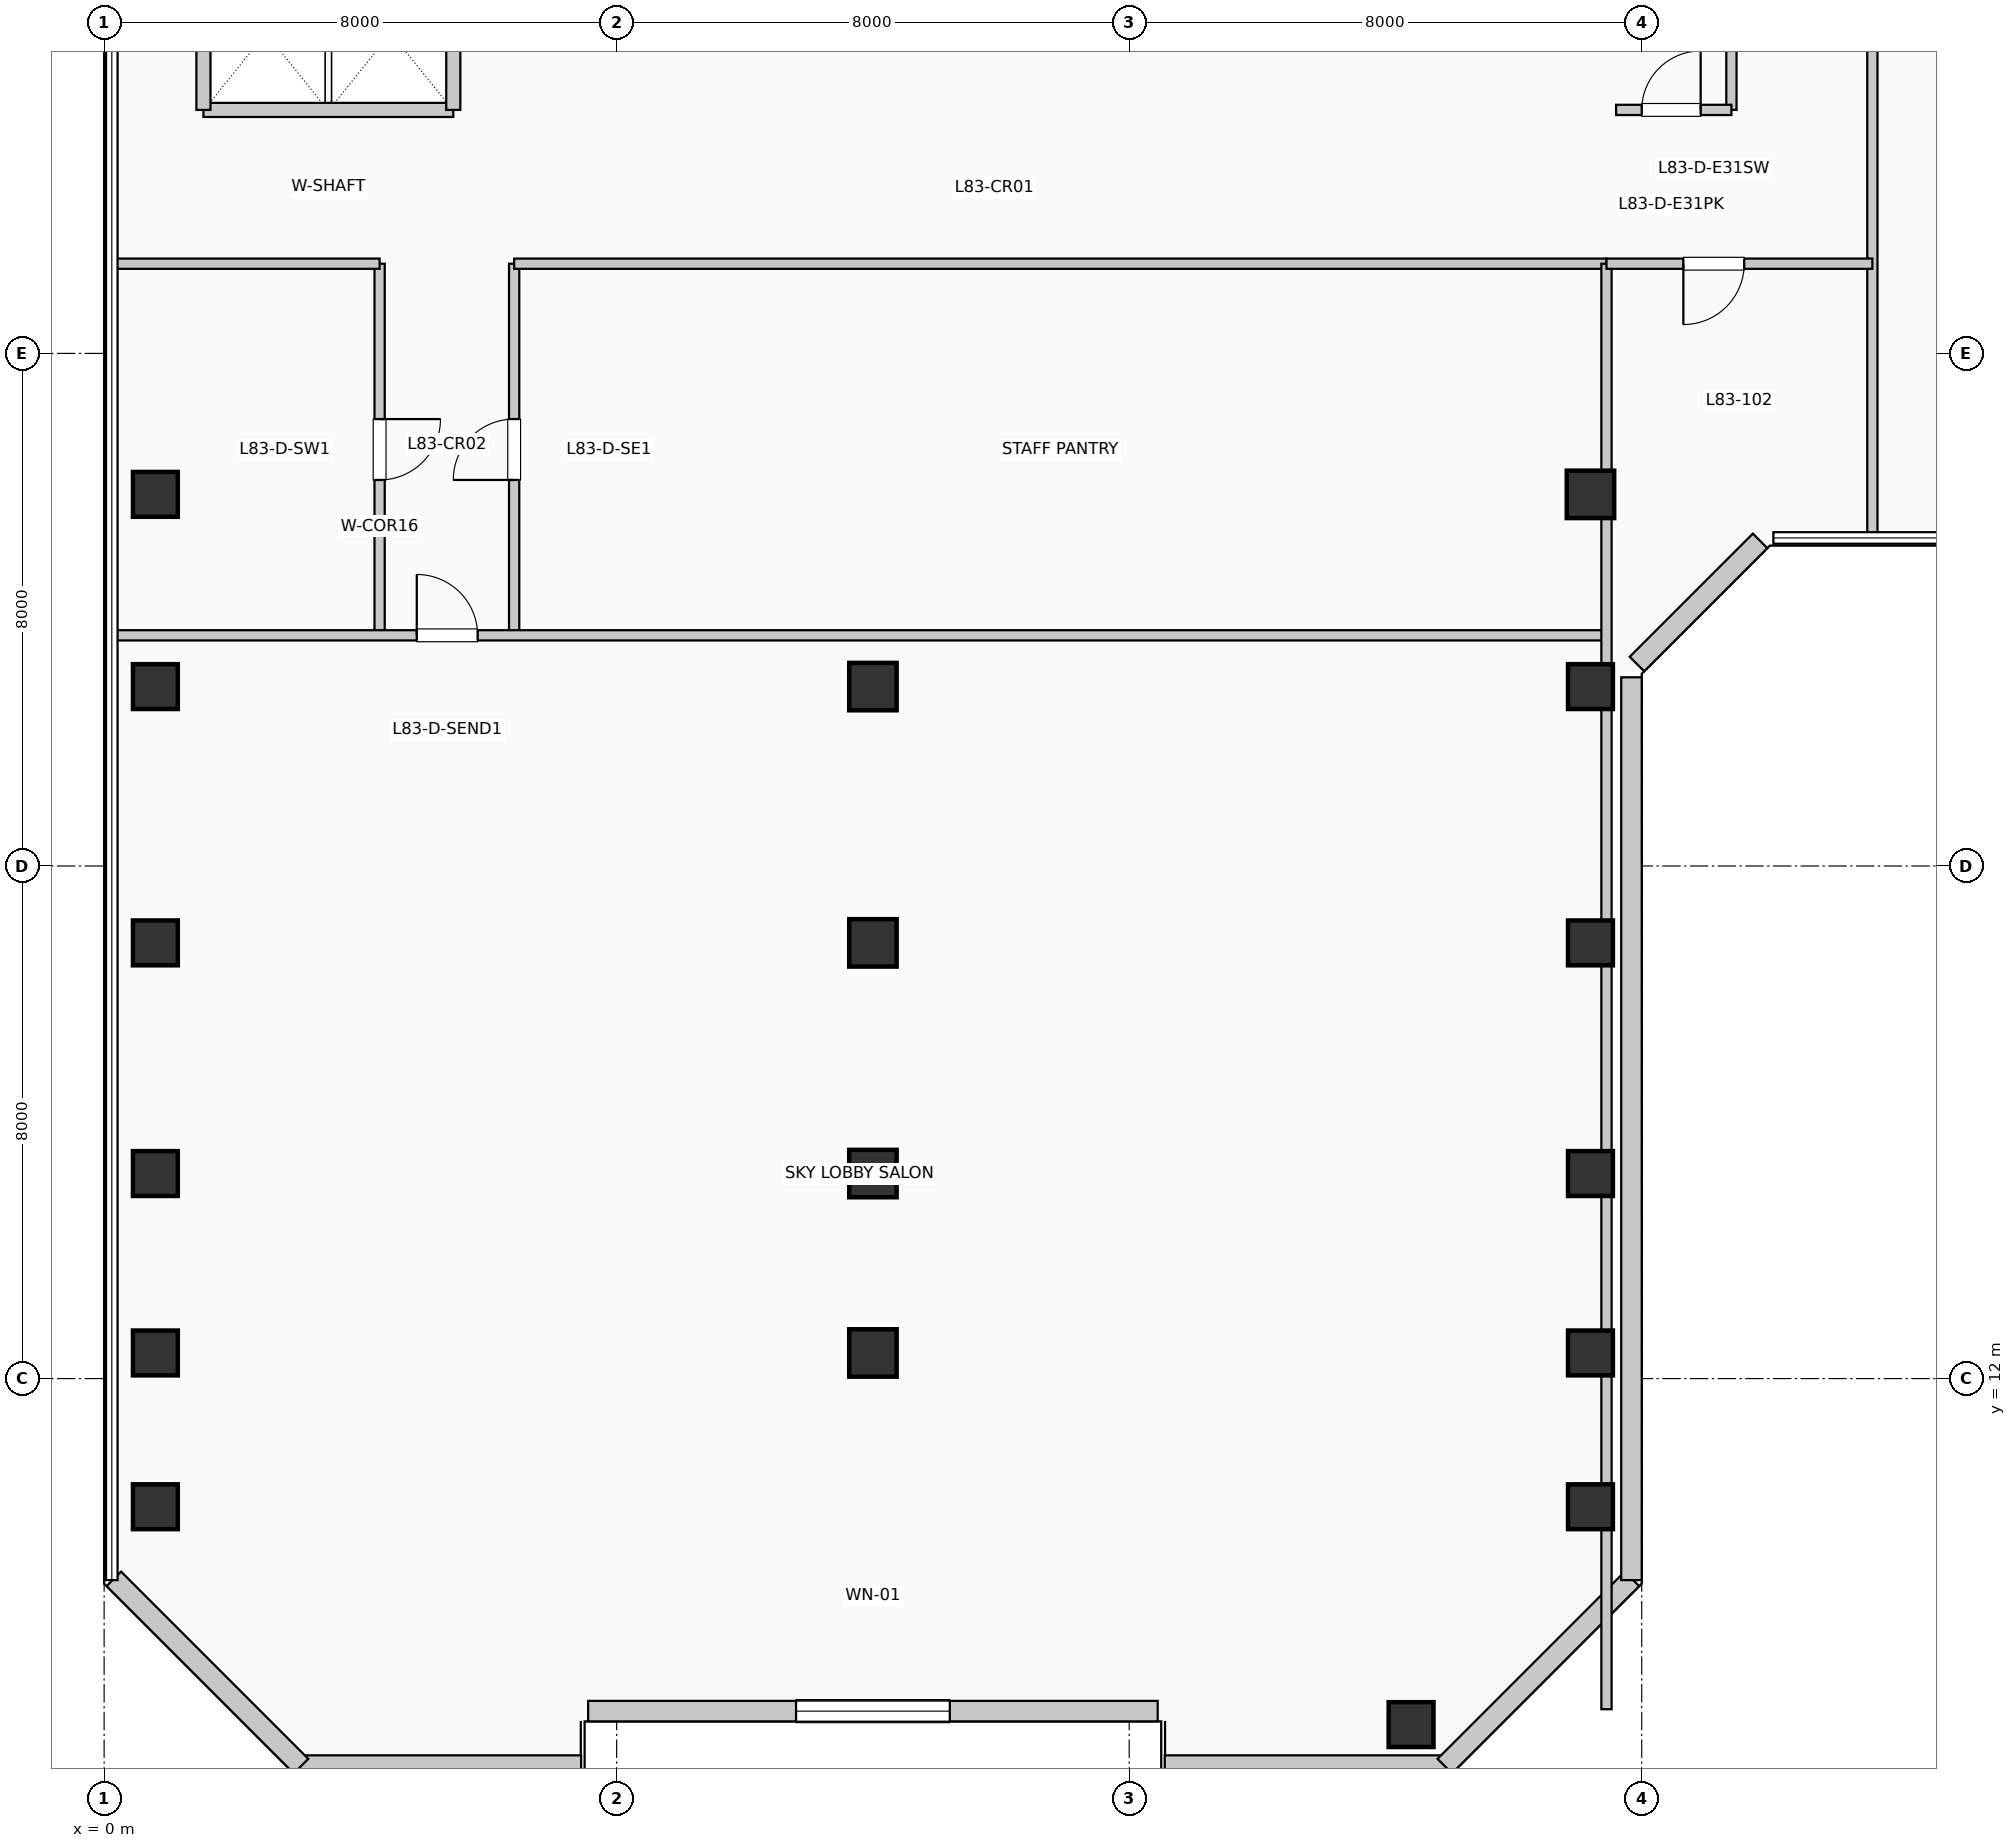
"""IFC4 building model, lengths in metres.
Left out: names, types, materials, properties, quantities, classifications, styles, units other than length and angle.
Written with IfcOpenShell. Run it as: python <this file> out.ifc"""

import sys

from ifc_helpers import new_model, si_unit, direction, frame, frame_2d, origin, origin_2d, place, context, subcontext, project, spatial, rectangle, extrude, element, fill, save


model = new_model("IFC4")
c1 = context("Model", 3, precision=1e-05, world=origin(), true_north=direction((0.0, 1.0)))
c2 = subcontext(c1, "Body", "Model", "MODEL_VIEW")
j1 = project(units=[si_unit("LENGTHUNIT", "METRE"), si_unit("PLANEANGLEUNIT", "RADIAN")], contexts=[c1])
p1 = place(None, origin())
s1 = spatial("IfcSite", under=j1, at=p1, CompositionType="ELEMENT")
p2 = place(p1, origin())
s2 = spatial("IfcBuilding", under=s1, at=p2, CompositionType="ELEMENT")
p3 = place(p2, frame((0.0, 0.0, 339.57)))
s3 = spatial("IfcBuildingStorey", under=s2, at=p3, CompositionType="ELEMENT", Elevation=339.57)
for number, where, z_axis, x_axis in (
    (1, (0.8, 10.0, 0.0), (0.0, 0.0, 1.0), (1.0, 0.0, 0.0)),
    (2, (0.8, 12.4, 0.0), (0.0, 0.0, 1.0), (1.0, 0.0, 0.0)),
    (3, (0.8, 15.2, 0.0), (0.0, 0.0, 1.0), (1.0, 0.0, 0.0)),
    (4, (0.8, 18.8, 0.0), (0.0, 0.0, 1.0), (1.0, 0.0, 0.0)),
    (5, (0.8, 22.8, 0.0), (0.0, 0.0, 1.0), (1.0, 0.0, 0.0)),
    (6, (0.8, 25.8, 0.0), (0.0, 0.0, 1.0), (1.0, 0.0, 0.0)),
):
    element("IfcColumn", number, at=place(p3, frame(where, z_axis=z_axis, x_axis=x_axis)), inside=s3, PredefinedType="COLUMN", context=c2, shape_type="SweptSolid", body=[
        extrude(rectangle(XDim=0.7, YDim=0.7, at=origin_2d()), origin(), (0.0, 0.0, 1.0), 3.96),
    ])
for number, where, z_axis, x_axis in (
    (7, (12.0, 12.4, 0.0), (0.0, 0.0, 1.0), (1.0, 0.0, 0.0)),
    (8, (12.0, 15.2, 0.0), (0.0, 0.0, 1.0), (1.0, 0.0, 0.0)),
    (9, (12.0, 18.8, 0.0), (0.0, 0.0, 1.0), (1.0, 0.0, 0.0)),
    (10, (12.0, 22.8, 0.0), (0.0, 0.0, 1.0), (1.0, 0.0, 0.0)),
):
    element("IfcColumn", number, at=place(p3, frame(where, z_axis=z_axis, x_axis=x_axis)), inside=s3, PredefinedType="COLUMN", context=c2, shape_type="SweptSolid", body=[
        extrude(rectangle(XDim=0.74, YDim=0.74, at=origin_2d()), origin(), (0.0, 0.0, 1.0), 3.96),
    ])
for number, where, z_axis, x_axis in (
    (11, (20.4, 6.6, 0.0), (0.0, 0.0, 1.0), (1.0, 0.0, 0.0)),
    (12, (23.2, 10.0, 0.0), (0.0, 0.0, 1.0), (1.0, 0.0, 0.0)),
    (13, (23.2, 12.4, 0.0), (0.0, 0.0, 1.0), (1.0, 0.0, 0.0)),
    (14, (23.2, 15.2, 0.0), (0.0, 0.0, 1.0), (1.0, 0.0, 0.0)),
    (15, (23.2, 18.8, 0.0), (0.0, 0.0, 1.0), (1.0, 0.0, 0.0)),
    (16, (23.2, 22.8, 0.0), (0.0, 0.0, 1.0), (1.0, 0.0, 0.0)),
):
    element("IfcColumn", number, at=place(p3, frame(where, z_axis=z_axis, x_axis=x_axis)), inside=s3, PredefinedType="COLUMN", context=c2, shape_type="SweptSolid", body=[
        extrude(rectangle(XDim=0.7, YDim=0.7, at=origin_2d()), origin(), (0.0, 0.0, 1.0), 3.96),
    ])
p4 = place(p3, frame((23.2, 25.8, 0.0), z_axis=(0.0, 0.0, 1.0), x_axis=(1.0, 0.0, 0.0)))
e17 = element("IfcColumn", 17, at=p4, inside=s3, PredefinedType="COLUMN", context=c2, shape_type="SweptSolid", body=[
    extrude(rectangle(XDim=0.74, YDim=0.74, at=origin_2d()), origin(), (0.0, 0.0, 1.0), 3.96),
])
p5 = place(p3, frame((3.055, 5.96, 0.0), z_axis=(0.0, 0.0, 1.0), x_axis=(1.0, 0.0, 0.0)))
e18 = element("IfcWall", 18, at=p5, inside=s3, PredefinedType="SOLIDWALL", context=c2, shape_type="SweptSolid", body=[
    extrude(rectangle(XDim=4.39, YDim=0.32, at=frame_2d((2.195, 0.0))), origin(), (0.0, 0.0, 1.0), 3.74),
])
p6 = place(p3, frame((7.555, 6.81, 0.0), z_axis=(0.0, 0.0, 1.0), x_axis=(1.0, 0.0, 0.0)))
e19 = element("IfcWall", 19, at=p6, inside=s3, PredefinedType="SOLIDWALL", context=c2, shape_type="SweptSolid", body=[
    extrude(rectangle(XDim=8.89, YDim=0.32, at=frame_2d((4.445, 0.0))), origin(), (0.0, 0.0, 1.0), 3.74),
])
p7 = place(p6, frame((3.245, 0.0, 0.85)))
e20 = element("IfcOpeningElement", 20, at=p7, cuts=e19, PredefinedType="OPENING", context=c2, shape_type="SweptSolid", body=[
    extrude(rectangle(XDim=2.4, YDim=2.05, at=frame_2d((1.2, 1.025))), frame((0.0, 0.17, 0.0), z_axis=(0.0, -1.0, 0.0), x_axis=(1.0, 0.0, 0.0)), (0.0, 0.0, 1.0), 0.34),
])
p8 = place(p3, frame((16.555, 5.96, 0.0), z_axis=(0.0, 0.0, 1.0), x_axis=(1.0, 0.0, 0.0)))
e21 = element("IfcWall", 21, at=p8, inside=s3, PredefinedType="SOLIDWALL", context=c2, shape_type="SweptSolid", body=[
    extrude(rectangle(XDim=4.39, YDim=0.32, at=frame_2d((2.195, 0.0))), origin(), (0.0, 0.0, 1.0), 3.74),
])
p9 = place(p3, frame((20.926, 5.952, 0.0), z_axis=(0.0, 0.0, 1.0), x_axis=(0.707077242712, 0.707136318428, 0.0)))
e22 = element("IfcWall", 22, at=p9, inside=s3, PredefinedType="SOLIDWALL", context=c2, shape_type="SweptSolid", body=[
    extrude(rectangle(XDim=4.133, YDim=0.32, at=frame_2d((2.066, 0.0))), origin(), (0.0, 0.0, 1.0), 3.74),
])
p10 = place(p3, frame((23.84, 8.855, 0.0), z_axis=(0.0, 0.0, 1.0), x_axis=(0.0, 1.0, 0.0)))
e23 = element("IfcWall", 23, at=p10, inside=s3, PredefinedType="SOLIDWALL", context=c2, shape_type="SweptSolid", body=[
    extrude(rectangle(XDim=14.09, YDim=0.32, at=frame_2d((7.045, 0.0))), origin(), (0.0, 0.0, 1.0), 3.74),
])
p11 = place(p3, frame((23.926, 23.152, 0.0), z_axis=(0.0, 0.0, 1.0), x_axis=(0.707106781187, 0.707106781187, 0.0)))
e24 = element("IfcWall", 24, at=p11, inside=s3, PredefinedType="SOLIDWALL", context=c2, shape_type="SweptSolid", body=[
    extrude(rectangle(XDim=2.718, YDim=0.32, at=frame_2d((1.359, 0.0))), origin(), (0.0, 0.0, 1.0), 3.74),
])
p12 = place(p3, frame((0.152, 8.874, 0.0), z_axis=(0.0, 0.0, 1.0), x_axis=(0.707077242712, -0.707136318428, 0.0)))
e25 = element("IfcWall", 25, at=p12, inside=s3, PredefinedType="SOLIDWALL", context=c2, shape_type="SweptSolid", body=[
    extrude(rectangle(XDim=4.133, YDim=0.32, at=frame_2d((2.066, 0.0))), origin(), (0.0, 0.0, 1.0), 3.74),
])
p13 = place(p3, frame((1.55, 31.8, 0.0), z_axis=(0.0, 0.0, 1.0), x_axis=(1.0, 0.0, 0.0)))
e26 = element("IfcWall", 26, at=p13, inside=s3, PredefinedType="PARTITIONING", context=c2, shape_type="SweptSolid", body=[
    extrude(rectangle(XDim=3.9, YDim=0.22, at=frame_2d((1.95, 0.0))), origin(), (0.0, 0.0, 1.0), 3.74),
])
for number, where, z_axis, x_axis in (
    (27, (1.55, 31.8, 0.0), (0.0, 0.0, 1.0), (0.0, 1.0, 0.0)),
    (28, (5.45, 31.8, 0.0), (0.0, 0.0, 1.0), (0.0, 1.0, 0.0)),
):
    element("IfcWall", number, at=place(p3, frame(where, z_axis=z_axis, x_axis=x_axis)), inside=s3, PredefinedType="PARTITIONING", context=c2, shape_type="SweptSolid", body=[
        extrude(rectangle(XDim=2.38, YDim=0.22, at=frame_2d((1.19, 0.0))), origin(), (0.0, 0.0, 1.0), 3.74),
    ])
p14 = place(p3, frame((4.3, 23.6, 0.0), z_axis=(0.0, 0.0, 1.0), x_axis=(0.0, 1.0, 0.0)))
e29 = element("IfcWall", 29, at=p14, inside=s3, PredefinedType="PARTITIONING", context=c2, shape_type="SweptSolid", body=[
    extrude(rectangle(XDim=5.8, YDim=0.16, at=frame_2d((2.9, 0.0))), origin(), (0.0, 0.0, 1.0), 3.74),
])
p15 = place(p14, frame((3.375, 0.0, 0.0), z_axis=(0.0, 0.0, 1.0), x_axis=(-1.0, 0.0, 0.0)))
e30 = element("IfcOpeningElement", 30, at=p15, cuts=e29, PredefinedType="OPENING", context=c2, shape_type="SweptSolid", body=[
    extrude(rectangle(XDim=0.95, YDim=2.15, at=frame_2d((0.475, 1.075))), frame((0.0, 0.09, 0.0), z_axis=(0.0, -1.0, 0.0), x_axis=(1.0, 0.0, 0.0)), (0.0, 0.0, 1.0), 0.18),
])
p16 = place(p3, frame((6.4, 23.6, 0.0), z_axis=(0.0, 0.0, 1.0), x_axis=(0.0, 1.0, 0.0)))
e31 = element("IfcWall", 31, at=p16, inside=s3, PredefinedType="PARTITIONING", context=c2, shape_type="SweptSolid", body=[
    extrude(rectangle(XDim=5.8, YDim=0.16, at=frame_2d((2.9, 0.0))), origin(), (0.0, 0.0, 1.0), 3.74),
])
p17 = place(p16, frame((2.425, 0.0, 0.0)))
e32 = element("IfcOpeningElement", 32, at=p17, cuts=e31, PredefinedType="OPENING", context=c2, shape_type="SweptSolid", body=[
    extrude(rectangle(XDim=0.95, YDim=2.15, at=frame_2d((0.475, 1.075))), frame((0.0, 0.09, 0.0), z_axis=(0.0, -1.0, 0.0), x_axis=(1.0, 0.0, 0.0)), (0.0, 0.0, 1.0), 0.18),
])
p18 = place(p3, frame((0.19, 23.6, 0.0), z_axis=(0.0, 0.0, 1.0), x_axis=(1.0, 0.0, 0.0)))
e33 = element("IfcWall", 33, at=p18, inside=s3, PredefinedType="PARTITIONING", context=c2, shape_type="SweptSolid", body=[
    extrude(rectangle(XDim=23.26, YDim=0.16, at=frame_2d((11.63, 0.0))), origin(), (0.0, 0.0, 1.0), 3.74),
])
p19 = place(p18, frame((4.69, 0.0, 0.0)))
e34 = element("IfcOpeningElement", 34, at=p19, cuts=e33, PredefinedType="OPENING", context=c2, shape_type="SweptSolid", body=[
    extrude(rectangle(XDim=0.95, YDim=2.15, at=frame_2d((0.475, 1.075))), frame((0.0, 0.09, 0.0), z_axis=(0.0, -1.0, 0.0), x_axis=(1.0, 0.0, 0.0)), (0.0, 0.0, 1.0), 0.18),
])
p20 = place(p3, frame((0.19, 29.4, 0.0), z_axis=(0.0, 0.0, 1.0), x_axis=(1.0, 0.0, 0.0)))
e35 = element("IfcWall", 35, at=p20, inside=s3, PredefinedType="PARTITIONING", context=c2, shape_type="SweptSolid", body=[
    extrude(rectangle(XDim=4.11, YDim=0.16, at=frame_2d((2.055, 0.0))), origin(), (0.0, 0.0, 1.0), 3.425),
])
p21 = place(p3, frame((6.4, 29.4, 0.0), z_axis=(0.0, 0.0, 1.0), x_axis=(1.0, 0.0, 0.0)))
e36 = element("IfcWall", 36, at=p21, inside=s3, PredefinedType="PARTITIONING", context=c2, shape_type="SweptSolid", body=[
    extrude(rectangle(XDim=17.05, YDim=0.16, at=frame_2d((8.525, 0.0))), origin(), (0.0, 0.0, 1.0), 3.425),
])
p22 = place(p3, frame((23.45, 6.84, 0.0), z_axis=(0.0, 0.0, 1.0), x_axis=(0.0, 1.0, 0.0)))
e37 = element("IfcWall", 37, at=p22, inside=s3, PredefinedType="PARTITIONING", context=c2, shape_type="SweptSolid", body=[
    extrude(rectangle(XDim=22.56, YDim=0.16, at=frame_2d((11.28, 0.0))), origin(), (0.0, 0.0, 1.0), 3.175),
])
p23 = place(p3, frame((25.4, 31.8, 0.0), z_axis=(0.0, 0.0, 1.0), x_axis=(0.0, 1.0, 0.0)))
e38 = element("IfcWall", 38, at=p23, inside=s3, PredefinedType="PARTITIONING", context=c2, shape_type="SweptSolid", body=[
    extrude(rectangle(XDim=14.01, YDim=0.16, at=frame_2d((7.005, 0.0))), origin(), (0.0, 0.0, 1.0), 3.74),
])
p24 = place(p3, frame((27.6, 25.19, 0.0), z_axis=(0.0, 0.0, 1.0), x_axis=(0.0, 1.0, 0.0)))
e39 = element("IfcWall", 39, at=p24, inside=s3, PredefinedType="PARTITIONING", context=c2, shape_type="SweptSolid", body=[
    extrude(rectangle(XDim=15.21, YDim=0.16, at=frame_2d((7.605, 0.0))), origin(), (0.0, 0.0, 1.0), 3.74),
])
p25 = place(p3, frame((23.45, 29.4, 0.0), z_axis=(0.0, 0.0, 1.0), x_axis=(1.0, 0.0, 0.0)))
e40 = element("IfcWall", 40, at=p25, inside=s3, PredefinedType="PARTITIONING", context=c2, shape_type="SweptSolid", body=[
    extrude(rectangle(XDim=4.15, YDim=0.16, at=frame_2d((2.075, 0.0))), origin(), (0.0, 0.0, 1.0), 3.425),
])
p26 = place(p25, frame((2.15, 0.0, 0.0), z_axis=(0.0, 0.0, 1.0), x_axis=(-1.0, 0.0, 0.0)))
e41 = element("IfcOpeningElement", 41, at=p26, cuts=e40, PredefinedType="OPENING", context=c2, shape_type="SweptSolid", body=[
    extrude(rectangle(XDim=0.95, YDim=2.15, at=frame_2d((0.475, 1.075))), frame((0.0, 0.09, 0.0), z_axis=(0.0, -1.0, 0.0), x_axis=(1.0, 0.0, 0.0)), (0.0, 0.0, 1.0), 0.18),
])
p27 = place(p3, frame((23.6, 31.8, 0.0), z_axis=(0.0, 0.0, 1.0), x_axis=(1.0, 0.0, 0.0)))
e42 = element("IfcWall", 42, at=p27, inside=s3, PredefinedType="PARTITIONING", context=c2, shape_type="SweptSolid", body=[
    extrude(rectangle(XDim=1.8, YDim=0.16, at=frame_2d((0.9, 0.0))), origin(), (0.0, 0.0, 1.0), 3.74),
])
p28 = place(p27, frame((0.4, 0.0, 0.0)))
e43 = element("IfcOpeningElement", 43, at=p28, cuts=e42, PredefinedType="OPENING", context=c2, shape_type="SweptSolid", body=[
    extrude(rectangle(XDim=0.92, YDim=2.1, at=frame_2d((0.46, 1.05))), frame((0.0, 0.09, 0.0), z_axis=(0.0, -1.0, 0.0), x_axis=(1.0, 0.0, 0.0)), (0.0, 0.0, 1.0), 0.18),
])
p29 = place(p7, origin())
e44 = element("IfcWindow", 44, at=p29, inside=s3, PartitioningType="SINGLE_PANEL", PredefinedType="WINDOW", context=c2, shape_type="SweptSolid", body=[
    extrude(rectangle(XDim=2.4, YDim=2.05, at=frame_2d((1.2, 1.025))), frame((0.0, 0.03, 0.0), z_axis=(0.0, -1.0, 0.0), x_axis=(1.0, 0.0, 0.0)), (0.0, 0.0, 1.0), 0.06),
])
fill(e20, e44)
p30 = place(p19, origin())
e45 = element("IfcDoor", 45, at=p30, inside=s3, OperationType="SINGLE_SWING_LEFT", PredefinedType="DOOR", context=c2, shape_type="SweptSolid", body=[
    extrude(rectangle(XDim=0.95, YDim=2.15, at=frame_2d((0.475, 1.075))), frame((0.0, 0.025, 0.0), z_axis=(0.0, -1.0, 0.0), x_axis=(1.0, 0.0, 0.0)), (0.0, 0.0, 1.0), 0.05),
])
fill(e34, e45)
p31 = place(p15, origin())
e46 = element("IfcDoor", 46, at=p31, inside=s3, OperationType="SINGLE_SWING_RIGHT", PredefinedType="DOOR", context=c2, shape_type="SweptSolid", body=[
    extrude(rectangle(XDim=0.95, YDim=2.15, at=frame_2d((0.475, 1.075))), frame((0.0, 0.025, 0.0), z_axis=(0.0, -1.0, 0.0), x_axis=(1.0, 0.0, 0.0)), (0.0, 0.0, 1.0), 0.05),
])
fill(e30, e46)
p32 = place(p17, origin())
e47 = element("IfcDoor", 47, at=p32, inside=s3, OperationType="SINGLE_SWING_LEFT", PredefinedType="DOOR", context=c2, shape_type="SweptSolid", body=[
    extrude(rectangle(XDim=0.95, YDim=2.15, at=frame_2d((0.475, 1.075))), frame((0.0, 0.025, 0.0), z_axis=(0.0, -1.0, 0.0), x_axis=(1.0, 0.0, 0.0)), (0.0, 0.0, 1.0), 0.05),
])
fill(e32, e47)
p33 = place(p28, origin())
e48 = element("IfcDoor", 48, at=p33, inside=s3, OperationType="SINGLE_SWING_RIGHT", PredefinedType="DOOR", context=c2, shape_type="SweptSolid", body=[
    extrude(rectangle(XDim=0.92, YDim=2.1, at=frame_2d((0.46, 1.05))), frame((0.0, 0.025, 0.0), z_axis=(0.0, -1.0, 0.0), x_axis=(1.0, 0.0, 0.0)), (0.0, 0.0, 1.0), 0.05),
])
fill(e43, e48)
p34 = place(p26, origin())
e49 = element("IfcDoor", 49, at=p34, inside=s3, OperationType="SINGLE_SWING_LEFT", PredefinedType="DOOR", context=c2, shape_type="SweptSolid", body=[
    extrude(rectangle(XDim=0.95, YDim=2.15, at=frame_2d((0.475, 1.075))), frame((0.0, 0.025, 0.0), z_axis=(0.0, -1.0, 0.0), x_axis=(1.0, 0.0, 0.0)), (0.0, 0.0, 1.0), 0.05),
])
fill(e41, e49)
save(model, sys.argv[1])
